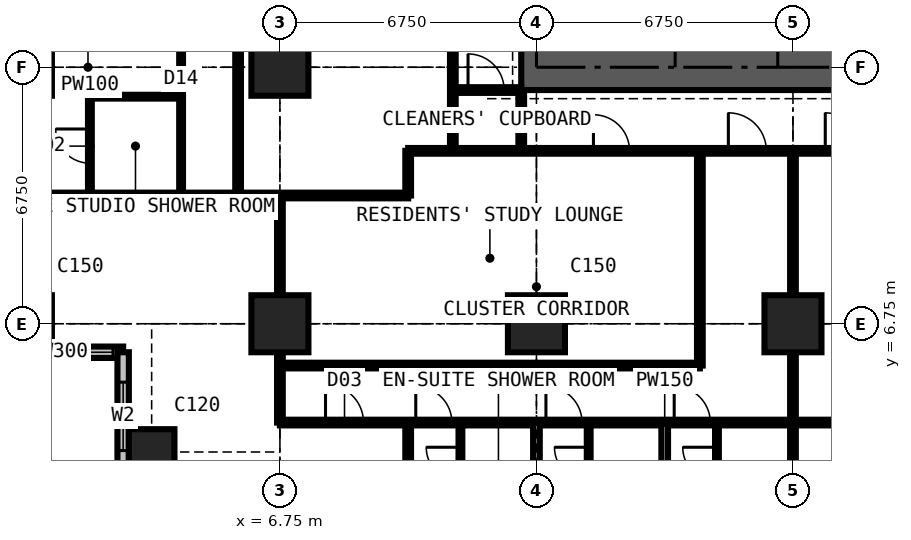
"""IFC4 building model, lengths in metres.
Left out: names, types, materials, properties, quantities, classifications, styles, units other than length and angle.
Written with IfcOpenShell. Run it as: python <this file> out.ifc"""

import sys

from ifc_helpers import new_model, si_unit, direction, frame, frame_2d, origin, origin_2d, place, context, subcontext, project, spatial, rectangle, extrude, element, fill, save


model = new_model("IFC4")
c1 = context("Model", 3, precision=1e-05, world=origin(), true_north=direction((0.0, 1.0)))
c2 = subcontext(c1, "Body", "Model", "MODEL_VIEW")
j1 = project(units=[si_unit("LENGTHUNIT", "METRE"), si_unit("PLANEANGLEUNIT", "RADIAN")], contexts=[c1])
p1 = place(None, origin())
s1 = spatial("IfcSite", under=j1, at=p1, CompositionType="ELEMENT")
p2 = place(p1, origin())
s2 = spatial("IfcBuilding", under=s1, at=p2, CompositionType="ELEMENT")
p3 = place(p2, frame((0.0, 0.0, 149.4)))
s3 = spatial("IfcBuildingStorey", under=s2, at=p3, CompositionType="ELEMENT", Elevation=149.4)
p4 = place(p3, frame((3.375, 3.375, 0.0), z_axis=(0.0, 0.0, 1.0), x_axis=(1.0, 0.0, 0.0)))
e1 = element("IfcColumn", 1, at=p4, inside=s3, PredefinedType="COLUMN", context=c2, shape_type="SweptSolid", body=[
    extrude(rectangle(XDim=1.2, YDim=1.2, at=origin_2d()), origin(), (0.0, 0.0, 1.0), 3.6),
])
for number, where, z_axis, x_axis in (
    (2, (6.75, 6.75, 0.0), (0.0, 0.0, 1.0), (1.0, 0.0, 0.0)),
    (3, (6.75, 13.5, 0.0), (0.0, 0.0, 1.0), (1.0, 0.0, 0.0)),
    (4, (13.5, 6.75, 0.0), (0.0, 0.0, 1.0), (1.0, 0.0, 0.0)),
    (5, (20.25, 6.75, 0.0), (0.0, 0.0, 1.0), (1.0, 0.0, 0.0)),
):
    element("IfcColumn", number, at=place(p3, frame(where, z_axis=z_axis, x_axis=x_axis)), inside=s3, PredefinedType="COLUMN", context=c2, shape_type="SweptSolid", body=[
        extrude(rectangle(XDim=1.5, YDim=1.5, at=origin_2d()), origin(), (0.0, 0.0, 1.0), 3.6),
    ])
p5 = place(p3, frame((13.1, 13.5, 0.0), z_axis=(0.0, 0.0, 1.0), x_axis=(1.0, 0.0, 0.0)))
e6 = element("IfcWall", 6, at=p5, inside=s3, PredefinedType="SHEAR", context=c2, shape_type="SweptSolid", body=[
    extrude(rectangle(XDim=14.3, YDim=1.2, at=frame_2d((7.15, 0.0))), origin(), (0.0, 0.0, 1.0), 3.6),
])
p6 = place(p3, frame((-0.75, 6.0, 0.0), z_axis=(0.0, 0.0, 1.0), x_axis=(1.0, 0.0, 0.0)))
e7 = element("IfcWall", 7, at=p6, inside=s3, PredefinedType="SOLIDWALL", context=c2, shape_type="SweptSolid", body=[
    extrude(rectangle(XDim=3.375, YDim=0.3, at=frame_2d((1.688, 0.0))), origin(), (0.0, 0.0, 1.0), 3.375),
])
p7 = place(p6, frame((1.607, 0.0, 0.9)))
e8 = element("IfcOpeningElement", 8, at=p7, cuts=e7, PredefinedType="OPENING", context=c2, shape_type="SweptSolid", body=[
    extrude(rectangle(XDim=1.5, YDim=1.8, at=frame_2d((0.75, 0.9))), frame((0.0, 0.16, 0.0), z_axis=(0.0, -1.0, 0.0), x_axis=(1.0, 0.0, 0.0)), (0.0, 0.0, 1.0), 0.32),
])
p8 = place(p3, frame((2.625, 6.0, 0.0), z_axis=(0.0, 0.0, 1.0), x_axis=(0.0, -1.0, 0.0)))
e9 = element("IfcWall", 9, at=p8, inside=s3, PredefinedType="SOLIDWALL", context=c2, shape_type="SweptSolid", body=[
    extrude(rectangle(XDim=3.375, YDim=0.3, at=frame_2d((1.688, 0.0))), origin(), (0.0, 0.0, 1.0), 3.375),
])
p9 = place(p8, frame((0.788, 0.0, 0.6)))
e10 = element("IfcOpeningElement", 10, at=p9, cuts=e9, PredefinedType="OPENING", context=c2, shape_type="SweptSolid", body=[
    extrude(rectangle(XDim=1.8, YDim=2.1, at=frame_2d((0.9, 1.05))), frame((0.0, 0.16, 0.0), z_axis=(0.0, -1.0, 0.0), x_axis=(1.0, 0.0, 0.0)), (0.0, 0.0, 1.0), 0.32),
])
p10 = place(p3, frame((-0.734, 10.125, 0.0), z_axis=(0.0, 0.0, 1.0), x_axis=(1.0, 0.0, 0.0)))
e11 = element("IfcWall", 11, at=p10, inside=s3, PredefinedType="PARTITIONING", context=c2, shape_type="SweptSolid", body=[
    extrude(rectangle(XDim=10.859, YDim=0.15, at=frame_2d((5.429, 0.0))), origin(), (0.0, 0.0, 1.0), 3.375),
])
p11 = place(p3, frame((1.75, 10.125, 0.0), z_axis=(0.0, 0.0, 1.0), x_axis=(0.0, 1.0, 0.0)))
e12 = element("IfcWall", 12, at=p11, inside=s3, PredefinedType="PARTITIONING", context=c2, shape_type="SweptSolid", body=[
    extrude(rectangle(XDim=2.6, YDim=0.1, at=frame_2d((1.3, 0.0))), origin(), (0.0, 0.0, 1.0), 3.375),
])
p12 = place(p11, frame((0.85, 0.0, 0.0)))
e13 = element("IfcOpeningElement", 13, at=p12, cuts=e12, PredefinedType="OPENING", context=c2, shape_type="SweptSolid", body=[
    extrude(rectangle(XDim=0.9, YDim=2.2, at=frame_2d((0.45, 1.1))), frame((0.0, 0.06, 0.0), z_axis=(0.0, -1.0, 0.0), x_axis=(1.0, 0.0, 0.0)), (0.0, 0.0, 1.0), 0.12),
])
p13 = place(p3, frame((1.75, 12.725, 0.0), z_axis=(0.0, 0.0, 1.0), x_axis=(1.0, 0.0, 0.0)))
e14 = element("IfcWall", 14, at=p13, inside=s3, PredefinedType="PARTITIONING", context=c2, shape_type="SweptSolid", body=[
    extrude(rectangle(XDim=2.4, YDim=0.1, at=frame_2d((1.2, 0.0))), origin(), (0.0, 0.0, 1.0), 3.375),
])
p14 = place(p3, frame((4.15, 10.125, 0.0), z_axis=(0.0, 0.0, 1.0), x_axis=(0.0, 1.0, 0.0)))
e15 = element("IfcWall", 15, at=p14, inside=s3, PredefinedType="PARTITIONING", context=c2, shape_type="SweptSolid", body=[
    extrude(rectangle(XDim=16.875, YDim=0.1, at=frame_2d((8.438, 0.0))), origin(), (0.0, 0.0, 1.0), 3.375),
])
p15 = place(p14, frame((4.2, 0.0, 0.0)))
e16 = element("IfcOpeningElement", 16, at=p15, cuts=e15, PredefinedType="OPENING", context=c2, shape_type="SweptSolid", body=[
    extrude(rectangle(XDim=0.95, YDim=2.2, at=frame_2d((0.475, 1.1))), frame((0.0, 0.06, 0.0), z_axis=(0.0, -1.0, 0.0), x_axis=(1.0, 0.0, 0.0)), (0.0, 0.0, 1.0), 0.12),
])
p16 = place(p14, frame((10.95, 0.0, 0.0)))
e17 = element("IfcOpeningElement", 17, at=p16, cuts=e15, PredefinedType="OPENING", context=c2, shape_type="SweptSolid", body=[
    extrude(rectangle(XDim=0.95, YDim=2.2, at=frame_2d((0.475, 1.1))), frame((0.0, 0.06, 0.0), z_axis=(0.0, -1.0, 0.0), x_axis=(1.0, 0.0, 0.0)), (0.0, 0.0, 1.0), 0.12),
])
p17 = place(p3, frame((5.65, 10.125, 0.0), z_axis=(0.0, 0.0, 1.0), x_axis=(0.0, 1.0, 0.0)))
e18 = element("IfcWall", 18, at=p17, inside=s3, PredefinedType="PARTITIONING", context=c2, shape_type="SweptSolid", body=[
    extrude(rectangle(XDim=10.762, YDim=0.15, at=frame_2d((5.381, 0.0))), origin(), (0.0, 0.0, 1.0), 3.375),
])
p18 = place(p17, frame((4.9, 0.0, 0.0)))
e19 = element("IfcOpeningElement", 19, at=p18, cuts=e18, PredefinedType="OPENING", context=c2, shape_type="SweptSolid", body=[
    extrude(rectangle(XDim=0.95, YDim=2.2, at=frame_2d((0.475, 1.1))), frame((0.0, 0.085, 0.0), z_axis=(0.0, -1.0, 0.0), x_axis=(1.0, 0.0, 0.0)), (0.0, 0.0, 1.0), 0.17),
])
p19 = place(p3, frame((6.75, 4.15, 0.0), z_axis=(0.0, 0.0, 1.0), x_axis=(0.0, 1.0, 0.0)))
e20 = element("IfcWall", 20, at=p19, inside=s3, PredefinedType="PARTITIONING", context=c2, shape_type="SweptSolid", body=[
    extrude(rectangle(XDim=5.975, YDim=0.15, at=frame_2d((2.988, 0.0))), origin(), (0.0, 0.0, 1.0), 2.877),
])
p20 = place(p3, frame((6.75, 4.15, 0.0), z_axis=(0.0, 0.0, 1.0), x_axis=(1.0, 0.0, 0.0)))
e21 = element("IfcWall", 21, at=p20, inside=s3, PredefinedType="PARTITIONING", context=c2, shape_type="SweptSolid", body=[
    extrude(rectangle(XDim=20.25, YDim=0.15, at=frame_2d((10.125, 0.0))), origin(), (0.0, 0.0, 1.0), 3.375),
])
p21 = place(p20, frame((1.2, 0.0, 0.0)))
e22 = element("IfcOpeningElement", 22, at=p21, cuts=e21, PredefinedType="OPENING", context=c2, shape_type="SweptSolid", body=[
    extrude(rectangle(XDim=1.0, YDim=2.2, at=frame_2d((0.5, 1.1))), frame((0.0, 0.085, 0.0), z_axis=(0.0, -1.0, 0.0), x_axis=(1.0, 0.0, 0.0)), (0.0, 0.0, 1.0), 0.17),
])
p22 = place(p20, frame((3.575, 0.0, 0.0)))
e23 = element("IfcOpeningElement", 23, at=p22, cuts=e21, PredefinedType="OPENING", context=c2, shape_type="SweptSolid", body=[
    extrude(rectangle(XDim=0.95, YDim=2.2, at=frame_2d((0.475, 1.1))), frame((0.0, 0.085, 0.0), z_axis=(0.0, -1.0, 0.0), x_axis=(1.0, 0.0, 0.0)), (0.0, 0.0, 1.0), 0.17),
])
p23 = place(p20, frame((7.0, 0.0, 0.0)))
e24 = element("IfcOpeningElement", 24, at=p23, cuts=e21, PredefinedType="OPENING", context=c2, shape_type="SweptSolid", body=[
    extrude(rectangle(XDim=0.95, YDim=2.2, at=frame_2d((0.475, 1.1))), frame((0.0, 0.085, 0.0), z_axis=(0.0, -1.0, 0.0), x_axis=(1.0, 0.0, 0.0)), (0.0, 0.0, 1.0), 0.17),
])
p24 = place(p20, frame((10.375, 0.0, 0.0)))
e25 = element("IfcOpeningElement", 25, at=p24, cuts=e21, PredefinedType="OPENING", context=c2, shape_type="SweptSolid", body=[
    extrude(rectangle(XDim=0.95, YDim=2.2, at=frame_2d((0.475, 1.1))), frame((0.0, 0.085, 0.0), z_axis=(0.0, -1.0, 0.0), x_axis=(1.0, 0.0, 0.0)), (0.0, 0.0, 1.0), 0.17),
])
p25 = place(p20, frame((15.1, 0.0, 0.0)))
e26 = element("IfcOpeningElement", 26, at=p25, cuts=e21, PredefinedType="OPENING", context=c2, shape_type="SweptSolid", body=[
    extrude(rectangle(XDim=0.95, YDim=2.2, at=frame_2d((0.475, 1.1))), frame((0.0, 0.085, 0.0), z_axis=(0.0, -1.0, 0.0), x_axis=(1.0, 0.0, 0.0)), (0.0, 0.0, 1.0), 0.17),
])
p26 = place(p3, frame((6.75, 5.65, 0.0), z_axis=(0.0, 0.0, 1.0), x_axis=(1.0, 0.0, 0.0)))
e27 = element("IfcWall", 27, at=p26, inside=s3, PredefinedType="PARTITIONING", context=c2, shape_type="SweptSolid", body=[
    extrude(rectangle(XDim=11.05, YDim=0.15, at=frame_2d((5.525, 0.0))), origin(), (0.0, 0.0, 1.0), 3.375),
])
p27 = place(p3, frame((10.125, -0.734, 0.0), z_axis=(0.0, 0.0, 1.0), x_axis=(0.0, 1.0, 0.0)))
e28 = element("IfcWall", 28, at=p27, inside=s3, PredefinedType="PARTITIONING", context=c2, shape_type="SweptSolid", body=[
    extrude(rectangle(XDim=4.884, YDim=0.15, at=frame_2d((2.442, 0.0))), origin(), (0.0, 0.0, 1.0), 3.375),
])
p28 = place(p3, frame((10.125, 10.125, 0.0), z_axis=(0.0, 0.0, 1.0), x_axis=(0.0, 1.0, 0.0)))
e29 = element("IfcWall", 29, at=p28, inside=s3, PredefinedType="PARTITIONING", context=c2, shape_type="SweptSolid", body=[
    extrude(rectangle(XDim=1.175, YDim=0.15, at=frame_2d((0.587, 0.0))), origin(), (0.0, 0.0, 1.0), 3.375),
])
p29 = place(p3, frame((10.125, 11.3, 0.0), z_axis=(0.0, 0.0, 1.0), x_axis=(1.0, 0.0, 0.0)))
e30 = element("IfcWall", 30, at=p29, inside=s3, PredefinedType="PARTITIONING", context=c2, shape_type="SweptSolid", body=[
    extrude(rectangle(XDim=20.475, YDim=0.15, at=frame_2d((10.238, 0.0))), origin(), (0.0, 0.0, 1.0), 3.375),
])
p30 = place(p29, frame((8.425, 0.0, 0.0)))
e31 = element("IfcOpeningElement", 31, at=p30, cuts=e30, PredefinedType="OPENING", context=c2, shape_type="SweptSolid", body=[
    extrude(rectangle(XDim=1.0, YDim=2.2, at=frame_2d((0.5, 1.1))), frame((0.0, 0.085, 0.0), z_axis=(0.0, -1.0, 0.0), x_axis=(1.0, 0.0, 0.0)), (0.0, 0.0, 1.0), 0.17),
])
p31 = place(p29, frame((10.975, 0.0, 0.0)))
e32 = element("IfcOpeningElement", 32, at=p31, cuts=e30, PredefinedType="OPENING", context=c2, shape_type="SweptSolid", body=[
    extrude(rectangle(XDim=1.0, YDim=2.2, at=frame_2d((0.5, 1.1))), frame((0.0, 0.085, 0.0), z_axis=(0.0, -1.0, 0.0), x_axis=(1.0, 0.0, 0.0)), (0.0, 0.0, 1.0), 0.17),
])
p32 = place(p29, frame((4.875, 0.0, 0.0)))
e33 = element("IfcOpeningElement", 33, at=p32, cuts=e30, PredefinedType="OPENING", context=c2, shape_type="SweptSolid", body=[
    extrude(rectangle(XDim=0.95, YDim=2.2, at=frame_2d((0.475, 1.1))), frame((0.0, 0.085, 0.0), z_axis=(0.0, -1.0, 0.0), x_axis=(1.0, 0.0, 0.0)), (0.0, 0.0, 1.0), 0.17),
])
p33 = place(p3, frame((11.3, 11.3, 0.0), z_axis=(0.0, 0.0, 1.0), x_axis=(0.0, 1.0, 0.0)))
e34 = element("IfcWall", 34, at=p33, inside=s3, PredefinedType="PARTITIONING", context=c2, shape_type="SweptSolid", body=[
    extrude(rectangle(XDim=19.3, YDim=0.15, at=frame_2d((9.65, 0.0))), origin(), (0.0, 0.0, 1.0), 3.375),
])
p34 = place(p33, frame((18.1, 0.0, 0.0)))
e35 = element("IfcOpeningElement", 35, at=p34, cuts=e34, PredefinedType="OPENING", context=c2, shape_type="SweptSolid", body=[
    extrude(rectangle(XDim=1.0, YDim=2.2, at=frame_2d((0.5, 1.1))), frame((0.0, 0.085, 0.0), z_axis=(0.0, -1.0, 0.0), x_axis=(1.0, 0.0, 0.0)), (0.0, 0.0, 1.0), 0.17),
])
p35 = place(p33, frame((10.137, 0.0, 0.0)))
e36 = element("IfcOpeningElement", 36, at=p35, cuts=e34, PredefinedType="OPENING", context=c2, shape_type="SweptSolid", body=[
    extrude(rectangle(XDim=1.0, YDim=2.2, at=frame_2d((0.5, 1.1))), frame((0.0, 0.085, 0.0), z_axis=(0.0, -1.0, 0.0), x_axis=(1.0, 0.0, 0.0)), (0.0, 0.0, 1.0), 0.17),
])
p36 = place(p3, frame((11.3, 12.9, 0.0), z_axis=(0.0, 0.0, 1.0), x_axis=(1.0, 0.0, 0.0)))
e37 = element("IfcWall", 37, at=p36, inside=s3, PredefinedType="PARTITIONING", context=c2, shape_type="SweptSolid", body=[
    extrude(rectangle(XDim=1.8, YDim=0.15, at=frame_2d((0.9, 0.0))), origin(), (0.0, 0.0, 1.0), 2.806),
])
p37 = place(p36, frame((0.4, 0.0, 0.0)))
e38 = element("IfcOpeningElement", 38, at=p37, cuts=e37, PredefinedType="OPENING", context=c2, shape_type="SweptSolid", body=[
    extrude(rectangle(XDim=0.95, YDim=2.2, at=frame_2d((0.475, 1.1))), frame((0.0, 0.085, 0.0), z_axis=(0.0, -1.0, 0.0), x_axis=(1.0, 0.0, 0.0)), (0.0, 0.0, 1.0), 0.17),
])
p38 = place(p3, frame((11.5, 1.95, 0.0), z_axis=(0.0, 0.0, 1.0), x_axis=(0.0, 1.0, 0.0)))
e39 = element("IfcWall", 39, at=p38, inside=s3, PredefinedType="PARTITIONING", context=c2, shape_type="SweptSolid", body=[
    extrude(rectangle(XDim=2.2, YDim=0.1, at=frame_2d((1.1, 0.0))), origin(), (0.0, 0.0, 1.0), 3.375),
])
p39 = place(p38, frame((0.65, 0.0, 0.0)))
e40 = element("IfcOpeningElement", 40, at=p39, cuts=e39, PredefinedType="OPENING", context=c2, shape_type="SweptSolid", body=[
    extrude(rectangle(XDim=0.9, YDim=2.2, at=frame_2d((0.45, 1.1))), frame((0.0, 0.06, 0.0), z_axis=(0.0, -1.0, 0.0), x_axis=(1.0, 0.0, 0.0)), (0.0, 0.0, 1.0), 0.12),
])
p40 = place(p3, frame((13.1, 11.3, 0.0), z_axis=(0.0, 0.0, 1.0), x_axis=(0.0, 1.0, 0.0)))
e41 = element("IfcWall", 41, at=p40, inside=s3, PredefinedType="PARTITIONING", context=c2, shape_type="SweptSolid", body=[
    extrude(rectangle(XDim=1.6, YDim=0.15, at=frame_2d((0.8, 0.0))), origin(), (0.0, 0.0, 1.0), 3.375),
])
p41 = place(p3, frame((13.5, -0.734, 0.0), z_axis=(0.0, 0.0, 1.0), x_axis=(0.0, 1.0, 0.0)))
e42 = element("IfcWall", 42, at=p41, inside=s3, PredefinedType="PARTITIONING", context=c2, shape_type="SweptSolid", body=[
    extrude(rectangle(XDim=4.884, YDim=0.175, at=frame_2d((2.442, 0.0))), origin(), (0.0, 0.0, 1.0), 2.877),
])
p42 = place(p3, frame((14.875, 1.95, 0.0), z_axis=(0.0, 0.0, 1.0), x_axis=(0.0, 1.0, 0.0)))
e43 = element("IfcWall", 43, at=p42, inside=s3, PredefinedType="PARTITIONING", context=c2, shape_type="SweptSolid", body=[
    extrude(rectangle(XDim=2.2, YDim=0.1, at=frame_2d((1.1, 0.0))), origin(), (0.0, 0.0, 1.0), 3.375),
])
p43 = place(p42, frame((0.65, 0.0, 0.0)))
e44 = element("IfcOpeningElement", 44, at=p43, cuts=e43, PredefinedType="OPENING", context=c2, shape_type="SweptSolid", body=[
    extrude(rectangle(XDim=0.9, YDim=2.2, at=frame_2d((0.45, 1.1))), frame((0.0, 0.06, 0.0), z_axis=(0.0, -1.0, 0.0), x_axis=(1.0, 0.0, 0.0)), (0.0, 0.0, 1.0), 0.12),
])
p44 = place(p3, frame((16.875, -0.734, 0.0), z_axis=(0.0, 0.0, 1.0), x_axis=(0.0, 1.0, 0.0)))
e45 = element("IfcWall", 45, at=p44, inside=s3, PredefinedType="PARTITIONING", context=c2, shape_type="SweptSolid", body=[
    extrude(rectangle(XDim=4.884, YDim=0.175, at=frame_2d((2.442, 0.0))), origin(), (0.0, 0.0, 1.0), 3.375),
])
p45 = place(p3, frame((17.8, 5.65, 0.0), z_axis=(0.0, 0.0, 1.0), x_axis=(0.0, 1.0, 0.0)))
e46 = element("IfcWall", 46, at=p45, inside=s3, PredefinedType="PARTITIONING", context=c2, shape_type="SweptSolid", body=[
    extrude(rectangle(XDim=5.65, YDim=0.15, at=frame_2d((2.825, 0.0))), origin(), (0.0, 0.0, 1.0), 3.375),
])
p46 = place(p3, frame((18.25, 1.95, 0.0), z_axis=(0.0, 0.0, 1.0), x_axis=(0.0, 1.0, 0.0)))
e47 = element("IfcWall", 47, at=p46, inside=s3, PredefinedType="PARTITIONING", context=c2, shape_type="SweptSolid", body=[
    extrude(rectangle(XDim=2.2, YDim=0.1, at=frame_2d((1.1, 0.0))), origin(), (0.0, 0.0, 1.0), 3.375),
])
p47 = place(p46, frame((0.65, 0.0, 0.0)))
e48 = element("IfcOpeningElement", 48, at=p47, cuts=e47, PredefinedType="OPENING", context=c2, shape_type="SweptSolid", body=[
    extrude(rectangle(XDim=0.9, YDim=2.2, at=frame_2d((0.45, 1.1))), frame((0.0, 0.06, 0.0), z_axis=(0.0, -1.0, 0.0), x_axis=(1.0, 0.0, 0.0)), (0.0, 0.0, 1.0), 0.12),
])
p48 = place(p3, frame((20.25, -0.734, 0.0), z_axis=(0.0, 0.0, 1.0), x_axis=(0.0, 1.0, 0.0)))
e49 = element("IfcWall", 49, at=p48, inside=s3, PredefinedType="PARTITIONING", context=c2, shape_type="SweptSolid", body=[
    extrude(rectangle(XDim=12.034, YDim=0.15, at=frame_2d((6.017, 0.0))), origin(), (0.0, 0.0, 1.0), 2.806),
])
p49 = place(p7, origin())
e50 = element("IfcWindow", 50, at=p49, inside=s3, PartitioningType="SINGLE_PANEL", PredefinedType="WINDOW", context=c2, shape_type="SweptSolid", body=[
    extrude(rectangle(XDim=1.5, YDim=1.8, at=frame_2d((0.75, 0.9))), frame((0.0, 0.03, 0.0), z_axis=(0.0, -1.0, 0.0), x_axis=(1.0, 0.0, 0.0)), (0.0, 0.0, 1.0), 0.06),
])
fill(e8, e50)
p50 = place(p9, origin())
e51 = element("IfcWindow", 51, at=p50, inside=s3, PartitioningType="SINGLE_PANEL", PredefinedType="WINDOW", context=c2, shape_type="SweptSolid", body=[
    extrude(rectangle(XDim=1.8, YDim=2.1, at=frame_2d((0.9, 1.05))), frame((0.0, 0.03, 0.0), z_axis=(0.0, -1.0, 0.0), x_axis=(1.0, 0.0, 0.0)), (0.0, 0.0, 1.0), 0.06),
])
fill(e10, e51)
p51 = place(p37, origin())
e52 = element("IfcDoor", 52, at=p51, inside=s3, OperationType="SINGLE_SWING_LEFT", PredefinedType="DOOR", context=c2, shape_type="SweptSolid", body=[
    extrude(rectangle(XDim=0.95, YDim=2.2, at=frame_2d((0.475, 1.1))), frame((0.0, 0.025, 0.0), z_axis=(0.0, -1.0, 0.0), x_axis=(1.0, 0.0, 0.0)), (0.0, 0.0, 1.0), 0.05),
])
fill(e38, e52)
p52 = place(p21, origin())
e53 = element("IfcDoor", 53, at=p52, inside=s3, OperationType="SINGLE_SWING_LEFT", PredefinedType="DOOR", context=c2, shape_type="SweptSolid", body=[
    extrude(rectangle(XDim=1.0, YDim=2.2, at=frame_2d((0.5, 1.1))), frame((0.0, 0.025, 0.0), z_axis=(0.0, -1.0, 0.0), x_axis=(1.0, 0.0, 0.0)), (0.0, 0.0, 1.0), 0.05),
])
fill(e22, e53)
p53 = place(p22, origin())
e54 = element("IfcDoor", 54, at=p53, inside=s3, OperationType="SINGLE_SWING_LEFT", PredefinedType="DOOR", context=c2, shape_type="SweptSolid", body=[
    extrude(rectangle(XDim=0.95, YDim=2.2, at=frame_2d((0.475, 1.1))), frame((0.0, 0.025, 0.0), z_axis=(0.0, -1.0, 0.0), x_axis=(1.0, 0.0, 0.0)), (0.0, 0.0, 1.0), 0.05),
])
fill(e23, e54)
p54 = place(p39, origin())
e55 = element("IfcDoor", 55, at=p54, inside=s3, OperationType="SINGLE_SWING_RIGHT", PredefinedType="DOOR", context=c2, shape_type="SweptSolid", body=[
    extrude(rectangle(XDim=0.9, YDim=2.2, at=frame_2d((0.45, 1.1))), frame((0.0, 0.025, 0.0), z_axis=(0.0, -1.0, 0.0), x_axis=(1.0, 0.0, 0.0)), (0.0, 0.0, 1.0), 0.05),
])
fill(e40, e55)
p55 = place(p23, origin())
e56 = element("IfcDoor", 56, at=p55, inside=s3, OperationType="SINGLE_SWING_LEFT", PredefinedType="DOOR", context=c2, shape_type="SweptSolid", body=[
    extrude(rectangle(XDim=0.95, YDim=2.2, at=frame_2d((0.475, 1.1))), frame((0.0, 0.025, 0.0), z_axis=(0.0, -1.0, 0.0), x_axis=(1.0, 0.0, 0.0)), (0.0, 0.0, 1.0), 0.05),
])
fill(e24, e56)
p56 = place(p43, origin())
e57 = element("IfcDoor", 57, at=p56, inside=s3, OperationType="SINGLE_SWING_RIGHT", PredefinedType="DOOR", context=c2, shape_type="SweptSolid", body=[
    extrude(rectangle(XDim=0.9, YDim=2.2, at=frame_2d((0.45, 1.1))), frame((0.0, 0.025, 0.0), z_axis=(0.0, -1.0, 0.0), x_axis=(1.0, 0.0, 0.0)), (0.0, 0.0, 1.0), 0.05),
])
fill(e44, e57)
p57 = place(p24, origin())
e58 = element("IfcDoor", 58, at=p57, inside=s3, OperationType="SINGLE_SWING_LEFT", PredefinedType="DOOR", context=c2, shape_type="SweptSolid", body=[
    extrude(rectangle(XDim=0.95, YDim=2.2, at=frame_2d((0.475, 1.1))), frame((0.0, 0.025, 0.0), z_axis=(0.0, -1.0, 0.0), x_axis=(1.0, 0.0, 0.0)), (0.0, 0.0, 1.0), 0.05),
])
fill(e25, e58)
p58 = place(p47, origin())
e59 = element("IfcDoor", 59, at=p58, inside=s3, OperationType="SINGLE_SWING_RIGHT", PredefinedType="DOOR", context=c2, shape_type="SweptSolid", body=[
    extrude(rectangle(XDim=0.9, YDim=2.2, at=frame_2d((0.45, 1.1))), frame((0.0, 0.025, 0.0), z_axis=(0.0, -1.0, 0.0), x_axis=(1.0, 0.0, 0.0)), (0.0, 0.0, 1.0), 0.05),
])
fill(e48, e59)
p59 = place(p30, origin())
e60 = element("IfcDoor", 60, at=p59, inside=s3, OperationType="SINGLE_SWING_LEFT", PredefinedType="DOOR", context=c2, shape_type="SweptSolid", body=[
    extrude(rectangle(XDim=1.0, YDim=2.2, at=frame_2d((0.5, 1.1))), frame((0.0, 0.025, 0.0), z_axis=(0.0, -1.0, 0.0), x_axis=(1.0, 0.0, 0.0)), (0.0, 0.0, 1.0), 0.05),
])
fill(e31, e60)
p60 = place(p31, origin())
e61 = element("IfcDoor", 61, at=p60, inside=s3, OperationType="SINGLE_SWING_LEFT", PredefinedType="DOOR", context=c2, shape_type="SweptSolid", body=[
    extrude(rectangle(XDim=1.0, YDim=2.2, at=frame_2d((0.5, 1.1))), frame((0.0, 0.025, 0.0), z_axis=(0.0, -1.0, 0.0), x_axis=(1.0, 0.0, 0.0)), (0.0, 0.0, 1.0), 0.05),
])
fill(e32, e61)
p61 = place(p32, origin())
e62 = element("IfcDoor", 62, at=p61, inside=s3, OperationType="SINGLE_SWING_LEFT", PredefinedType="DOOR", context=c2, shape_type="SweptSolid", body=[
    extrude(rectangle(XDim=0.95, YDim=2.2, at=frame_2d((0.475, 1.1))), frame((0.0, 0.025, 0.0), z_axis=(0.0, -1.0, 0.0), x_axis=(1.0, 0.0, 0.0)), (0.0, 0.0, 1.0), 0.05),
])
fill(e33, e62)
p62 = place(p12, origin())
e63 = element("IfcDoor", 63, at=p62, inside=s3, OperationType="SINGLE_SWING_RIGHT", PredefinedType="DOOR", context=c2, shape_type="SweptSolid", body=[
    extrude(rectangle(XDim=0.9, YDim=2.2, at=frame_2d((0.45, 1.1))), frame((0.0, 0.025, 0.0), z_axis=(0.0, -1.0, 0.0), x_axis=(1.0, 0.0, 0.0)), (0.0, 0.0, 1.0), 0.05),
])
fill(e13, e63)
save(model, sys.argv[1])
